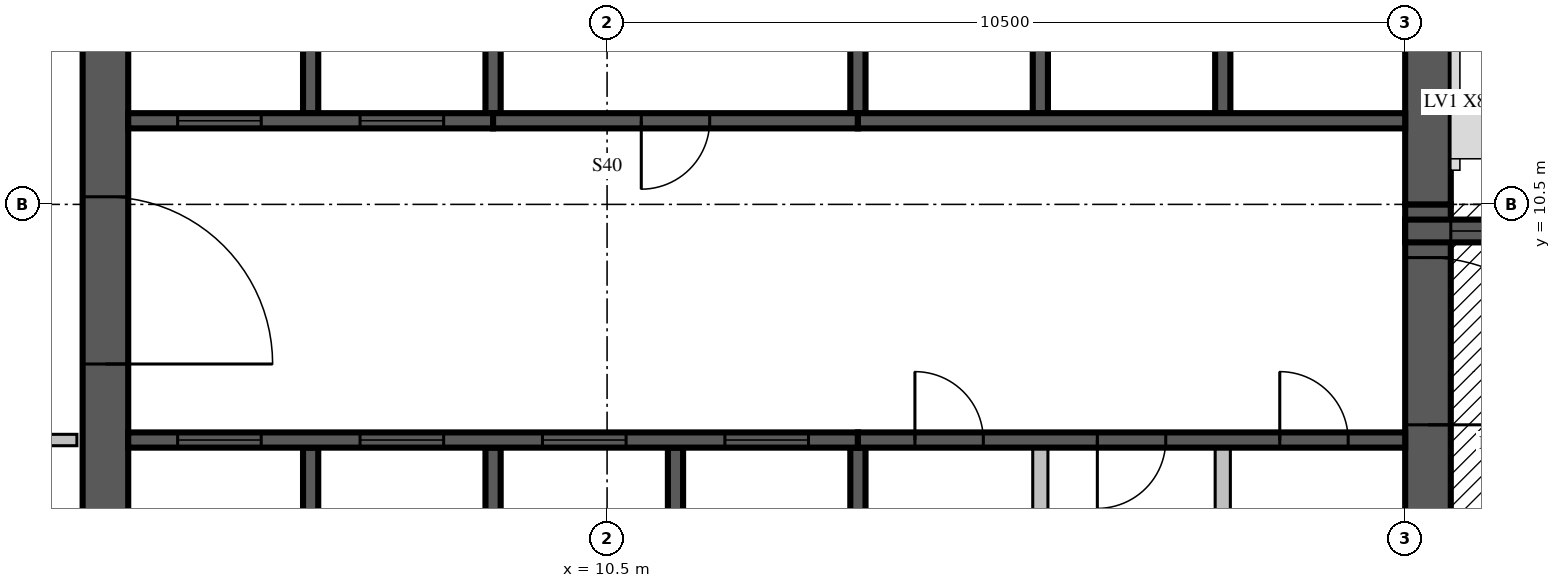
"""IFC4 building model, lengths in metres.
Left out: names, types, materials, properties, quantities, classifications, styles, units other than length and angle.
Written with IfcOpenShell. Run it as: python <this file> out.ifc"""

import sys

from ifc_helpers import new_model, si_unit, direction, frame, frame_2d, origin, place, context, subcontext, project, spatial, rectangle, extrude, source, transform, mapped, element, fill, save


model = new_model("IFC4")
c1 = context("Model", 3, precision=1e-05, world=origin(), true_north=direction((0.0, 1.0)))
c2 = subcontext(c1, "Body", "Model", "MODEL_VIEW")
j1 = project(units=[si_unit("LENGTHUNIT", "METRE"), si_unit("PLANEANGLEUNIT", "RADIAN")], contexts=[c1])
p1 = place(None, origin())
s1 = spatial("IfcSite", under=j1, at=p1, CompositionType="ELEMENT")
p2 = place(p1, origin())
s2 = spatial("IfcBuilding", under=s1, at=p2, CompositionType="ELEMENT")
p3 = place(p2, frame((0.0, 0.0, 330.0)))
s3 = spatial("IfcBuildingStorey", under=s2, at=p3, CompositionType="ELEMENT", Elevation=330.0)
m1 = source(origin(), c2, "Body", "SweptSolid", [
    extrude(rectangle(XDim=17.4, YDim=0.6, at=frame_2d((8.7, 0.0))), origin(), (0.0, 0.0, 1.0), 3.5),
])
p4 = place(p3, frame((3.9, 4.2, 0.0), z_axis=(0.0, 0.0, 1.0), x_axis=(0.0, 1.0, 0.0)))
e1 = element("IfcWall", 1, at=p4, inside=s3, PredefinedType="SHEAR", context=c2, shape_type="MappedRepresentation", body=[
    mapped(m1, transform((0.0, 0.0, 0.0), scale=1.0)),
])
m2 = source(origin(), c2, "Body", "SweptSolid", [
    extrude(rectangle(XDim=2.2, YDim=2.1, at=frame_2d((1.1, 1.05))), frame((0.0, 0.31, 0.0), z_axis=(0.0, -1.0, 0.0), x_axis=(1.0, 0.0, 0.0)), (0.0, 0.0, 1.0), 0.62),
])
p5 = place(p4, frame((4.2, 0.0, 0.0)))
e2 = element("IfcOpeningElement", 2, at=p5, cuts=e1, PredefinedType="OPENING", context=c2, shape_type="MappedRepresentation", body=[
    mapped(m2, transform((0.0, 0.0, 0.0), scale=1.0)),
])
m3 = source(origin(), c2, "Body", "SweptSolid", [
    extrude(rectangle(XDim=6.3, YDim=0.6, at=frame_2d((3.15, 0.0))), origin(), (0.0, 0.0, 1.0), 3.5),
])
p6 = place(p3, frame((21.3, 4.2, 0.0), z_axis=(0.0, 0.0, 1.0), x_axis=(0.0, 1.0, 0.0)))
e3 = element("IfcWall", 3, at=p6, inside=s3, PredefinedType="SHEAR", context=c2, shape_type="MappedRepresentation", body=[
    mapped(m3, transform((0.0, 0.0, 0.0), scale=1.0)),
])
p7 = place(p6, frame((3.4, 0.0, 0.0)))
e4 = element("IfcOpeningElement", 4, at=p7, cuts=e3, PredefinedType="OPENING", context=c2, shape_type="MappedRepresentation", body=[
    mapped(m2, transform((0.0, 0.0, 0.0), scale=1.0)),
])
m4 = source(origin(), c2, "Body", "SweptSolid", [
    extrude(rectangle(XDim=10.5, YDim=0.6, at=frame_2d((5.25, 0.0))), origin(), (0.0, 0.0, 1.0), 3.5),
])
p8 = place(p3, frame((21.3, 10.5, 0.0), z_axis=(0.0, 0.0, 1.0), x_axis=(0.0, 1.0, 0.0)))
e5 = element("IfcWall", 5, at=p8, inside=s3, PredefinedType="SHEAR", context=c2, shape_type="MappedRepresentation", body=[
    mapped(m4, transform((0.0, 0.0, 0.0), scale=1.0)),
])
m5 = source(origin(), c2, "Body", "SweptSolid", [
    extrude(rectangle(XDim=1.2, YDim=2.4, at=frame_2d((0.6, 1.2))), frame((0.0, 0.31, 0.0), z_axis=(0.0, -1.0, 0.0), x_axis=(1.0, 0.0, 0.0)), (0.0, 0.0, 1.0), 0.62),
])
p9 = place(p8, frame((5.7, 0.0, 0.6)))
e6 = element("IfcOpeningElement", 6, at=p9, cuts=e5, PredefinedType="OPENING", context=c2, shape_type="MappedRepresentation", body=[
    mapped(m5, transform((0.0, 0.0, 0.0), scale=1.0)),
])
p10 = place(p3, frame((21.0, 10.15, 0.0), z_axis=(0.0, 0.0, 1.0), x_axis=(1.0, 0.0, 0.0)))
e7 = element("IfcWall", 7, at=p10, inside=s3, PredefinedType="SOLIDWALL", context=c2, shape_type="SweptSolid", body=[
    extrude(rectangle(XDim=4.8, YDim=0.3, at=frame_2d((2.4, 0.0))), origin(), (0.0, 0.0, 1.0), 3.1),
])
m6 = source(origin(), c2, "Body", "SweptSolid", [
    extrude(rectangle(XDim=3.6, YDim=2.0, at=frame_2d((1.8, 1.0))), frame((0.0, 0.16, 0.0), z_axis=(0.0, -1.0, 0.0), x_axis=(1.0, 0.0, 0.0)), (0.0, 0.0, 1.0), 0.32),
])
p11 = place(p10, frame((0.6, 0.0, 0.6)))
e8 = element("IfcOpeningElement", 8, at=p11, cuts=e7, PredefinedType="OPENING", context=c2, shape_type="MappedRepresentation", body=[
    mapped(m6, transform((0.0, 0.0, 0.0), scale=1.0)),
])
m7 = source(origin(), c2, "Body", "SweptSolid", [
    extrude(rectangle(XDim=3.1, YDim=0.2, at=frame_2d((1.55, 0.0))), origin(), (0.0, 0.0, 1.0), 3.5),
])
for number, where, z_axis, x_axis in (
    (9, (6.6, 4.2, 0.0), (0.0, 0.0, 1.0), (0.0, 1.0, 0.0)),
    (10, (9.0, 4.2, 0.0), (0.0, 0.0, 1.0), (0.0, 1.0, 0.0)),
    (11, (11.4, 4.2, 0.0), (0.0, 0.0, 1.0), (0.0, 1.0, 0.0)),
):
    element("IfcWall", number, at=place(p3, frame(where, z_axis=z_axis, x_axis=x_axis)), inside=s3, PredefinedType="SOLIDWALL", context=c2, shape_type="MappedRepresentation", body=[
        mapped(m7, transform((0.0, 0.0, 0.0), scale=1.0)),
    ])
m8 = source(origin(), c2, "Body", "SweptSolid", [
    extrude(rectangle(XDim=3.1, YDim=0.2, at=frame_2d((1.55, 0.0))), origin(), (0.0, 0.0, 1.0), 3.1),
])
p12 = place(p3, frame((13.8, 4.2, 0.0), z_axis=(0.0, 0.0, 1.0), x_axis=(0.0, 1.0, 0.0)))
e12 = element("IfcWall", 12, at=p12, inside=s3, PredefinedType="SOLIDWALL", context=c2, shape_type="MappedRepresentation", body=[
    mapped(m8, transform((0.0, 0.0, 0.0), scale=1.0)),
])
m9 = source(origin(), c2, "Body", "SweptSolid", [
    extrude(rectangle(XDim=3.1, YDim=0.2, at=frame_2d((1.55, 0.0))), origin(), (0.0, 0.0, 1.0), 3.1),
])
for number, where, z_axis, x_axis in (
    (13, (16.2, 4.2, 0.0), (0.0, 0.0, 1.0), (0.0, 1.0, 0.0)),
    (14, (18.6, 4.2, 0.0), (0.0, 0.0, 1.0), (0.0, 1.0, 0.0)),
):
    element("IfcWall", number, at=place(p3, frame(where, z_axis=z_axis, x_axis=x_axis)), inside=s3, PredefinedType="PARTITIONING", context=c2, shape_type="MappedRepresentation", body=[
        mapped(m9, transform((0.0, 0.0, 0.0), scale=1.0)),
    ])
m10 = source(origin(), c2, "Body", "SweptSolid", [
    extrude(rectangle(XDim=3.0, YDim=0.2, at=frame_2d((1.5, 0.0))), origin(), (0.0, 0.0, 1.0), 3.5),
])
p13 = place(p3, frame((6.6, 11.7, 0.0), z_axis=(0.0, 0.0, 1.0), x_axis=(0.0, 1.0, 0.0)))
e15 = element("IfcWall", 15, at=p13, inside=s3, PredefinedType="SOLIDWALL", context=c2, shape_type="MappedRepresentation", body=[
    mapped(m10, transform((0.0, 0.0, 0.0), scale=1.0)),
])
m11 = source(origin(), c2, "Body", "SweptSolid", [
    extrude(rectangle(XDim=3.0, YDim=0.2, at=frame_2d((1.5, 0.0))), origin(), (0.0, 0.0, 1.0), 3.1),
])
for number, where, z_axis, x_axis in (
    (16, (9.0, 11.7, 0.0), (0.0, 0.0, 1.0), (0.0, 1.0, 0.0)),
    (17, (13.8, 11.7, 0.0), (0.0, 0.0, 1.0), (0.0, 1.0, 0.0)),
):
    element("IfcWall", number, at=place(p3, frame(where, z_axis=z_axis, x_axis=x_axis)), inside=s3, PredefinedType="SOLIDWALL", context=c2, shape_type="MappedRepresentation", body=[
        mapped(m11, transform((0.0, 0.0, 0.0), scale=1.0)),
    ])
for number, where, z_axis, x_axis in (
    (18, (16.2, 11.7, 0.0), (0.0, 0.0, 1.0), (0.0, 1.0, 0.0)),
    (19, (18.6, 11.7, 0.0), (0.0, 0.0, 1.0), (0.0, 1.0, 0.0)),
):
    element("IfcWall", number, at=place(p3, frame(where, z_axis=z_axis, x_axis=x_axis)), inside=s3, PredefinedType="SOLIDWALL", context=c2, shape_type="MappedRepresentation", body=[
        mapped(m10, transform((0.0, 0.0, 0.0), scale=1.0)),
    ])
m12 = source(origin(), c2, "Body", "SweptSolid", [
    extrude(rectangle(XDim=9.6, YDim=0.2, at=frame_2d((4.8, 0.0))), origin(), (0.0, 0.0, 1.0), 3.5),
])
p14 = place(p3, frame((4.2, 7.4, 0.0), z_axis=(0.0, 0.0, 1.0), x_axis=(1.0, 0.0, 0.0)))
e20 = element("IfcWall", 20, at=p14, inside=s3, PredefinedType="SOLIDWALL", context=c2, shape_type="MappedRepresentation", body=[
    mapped(m12, transform((0.0, 0.0, 0.0), scale=1.0)),
])
m13 = source(origin(), c2, "Body", "SweptSolid", [
    extrude(rectangle(XDim=1.1, YDim=2.1, at=frame_2d((0.55, 1.05))), frame((0.0, 0.11, 0.0), z_axis=(0.0, -1.0, 0.0), x_axis=(1.0, 0.0, 0.0)), (0.0, 0.0, 1.0), 0.22),
])
p15 = place(p14, frame((0.65, 0.0, 0.0)))
e21 = element("IfcOpeningElement", 21, at=p15, cuts=e20, PredefinedType="OPENING", context=c2, shape_type="MappedRepresentation", body=[
    mapped(m13, transform((0.0, 0.0, 0.0), scale=1.0)),
])
p16 = place(p14, frame((3.05, 0.0, 0.0)))
e22 = element("IfcOpeningElement", 22, at=p16, cuts=e20, PredefinedType="OPENING", context=c2, shape_type="MappedRepresentation", body=[
    mapped(m13, transform((0.0, 0.0, 0.0), scale=1.0)),
])
p17 = place(p14, frame((5.45, 0.0, 0.0)))
e23 = element("IfcOpeningElement", 23, at=p17, cuts=e20, PredefinedType="OPENING", context=c2, shape_type="MappedRepresentation", body=[
    mapped(m13, transform((0.0, 0.0, 0.0), scale=1.0)),
])
p18 = place(p14, frame((7.85, 0.0, 0.0)))
e24 = element("IfcOpeningElement", 24, at=p18, cuts=e20, PredefinedType="OPENING", context=c2, shape_type="MappedRepresentation", body=[
    mapped(m13, transform((0.0, 0.0, 0.0), scale=1.0)),
])
m14 = source(origin(), c2, "Body", "SweptSolid", [
    extrude(rectangle(XDim=7.2, YDim=0.2, at=frame_2d((3.6, 0.0))), origin(), (0.0, 0.0, 1.0), 3.1),
])
p19 = place(p3, frame((13.8, 7.4, 0.0), z_axis=(0.0, 0.0, 1.0), x_axis=(1.0, 0.0, 0.0)))
e25 = element("IfcWall", 25, at=p19, inside=s3, PredefinedType="SOLIDWALL", context=c2, shape_type="MappedRepresentation", body=[
    mapped(m14, transform((0.0, 0.0, 0.0), scale=1.0)),
])
m15 = source(origin(), c2, "Body", "SweptSolid", [
    extrude(rectangle(XDim=0.9, YDim=2.1, at=frame_2d((0.45, 1.05))), frame((0.0, 0.11, 0.0), z_axis=(0.0, -1.0, 0.0), x_axis=(1.0, 0.0, 0.0)), (0.0, 0.0, 1.0), 0.22),
])
p20 = place(p19, frame((0.75, 0.0, 0.0)))
e26 = element("IfcOpeningElement", 26, at=p20, cuts=e25, PredefinedType="OPENING", context=c2, shape_type="MappedRepresentation", body=[
    mapped(m15, transform((0.0, 0.0, 0.0), scale=1.0)),
])
p21 = place(p19, frame((3.15, 0.0, 0.0)))
e27 = element("IfcOpeningElement", 27, at=p21, cuts=e25, PredefinedType="OPENING", context=c2, shape_type="MappedRepresentation", body=[
    mapped(m15, transform((0.0, 0.0, 0.0), scale=1.0)),
])
p22 = place(p19, frame((5.55, 0.0, 0.0)))
e28 = element("IfcOpeningElement", 28, at=p22, cuts=e25, PredefinedType="OPENING", context=c2, shape_type="MappedRepresentation", body=[
    mapped(m15, transform((0.0, 0.0, 0.0), scale=1.0)),
])
m16 = source(origin(), c2, "Body", "SweptSolid", [
    extrude(rectangle(XDim=4.8, YDim=0.2, at=frame_2d((2.4, 0.0))), origin(), (0.0, 0.0, 1.0), 3.5),
])
p23 = place(p3, frame((4.2, 11.6, 0.0), z_axis=(0.0, 0.0, 1.0), x_axis=(1.0, 0.0, 0.0)))
e29 = element("IfcWall", 29, at=p23, inside=s3, PredefinedType="SOLIDWALL", context=c2, shape_type="MappedRepresentation", body=[
    mapped(m16, transform((0.0, 0.0, 0.0), scale=1.0)),
])
p24 = place(p23, frame((0.65, 0.0, 0.0)))
e30 = element("IfcOpeningElement", 30, at=p24, cuts=e29, PredefinedType="OPENING", context=c2, shape_type="MappedRepresentation", body=[
    mapped(m13, transform((0.0, 0.0, 0.0), scale=1.0)),
])
p25 = place(p23, frame((3.05, 0.0, 0.0)))
e31 = element("IfcOpeningElement", 31, at=p25, cuts=e29, PredefinedType="OPENING", context=c2, shape_type="MappedRepresentation", body=[
    mapped(m13, transform((0.0, 0.0, 0.0), scale=1.0)),
])
m17 = source(origin(), c2, "Body", "SweptSolid", [
    extrude(rectangle(XDim=4.8, YDim=0.2, at=frame_2d((2.4, 0.0))), origin(), (0.0, 0.0, 1.0), 3.1),
])
p26 = place(p3, frame((9.0, 11.6, 0.0), z_axis=(0.0, 0.0, 1.0), x_axis=(1.0, 0.0, 0.0)))
e32 = element("IfcWall", 32, at=p26, inside=s3, PredefinedType="SOLIDWALL", context=c2, shape_type="MappedRepresentation", body=[
    mapped(m17, transform((0.0, 0.0, 0.0), scale=1.0)),
])
p27 = place(p26, frame((1.95, 0.0, 0.0)))
e33 = element("IfcOpeningElement", 33, at=p27, cuts=e32, PredefinedType="OPENING", context=c2, shape_type="MappedRepresentation", body=[
    mapped(m15, transform((0.0, 0.0, 0.0), scale=1.0)),
])
m18 = source(origin(), c2, "Body", "SweptSolid", [
    extrude(rectangle(XDim=7.2, YDim=0.2, at=frame_2d((3.6, 0.0))), origin(), (0.0, 0.0, 1.0), 3.5),
])
p28 = place(p3, frame((13.8, 11.6, 0.0), z_axis=(0.0, 0.0, 1.0), x_axis=(1.0, 0.0, 0.0)))
e34 = element("IfcWall", 34, at=p28, inside=s3, PredefinedType="SOLIDWALL", context=c2, shape_type="MappedRepresentation", body=[
    mapped(m18, transform((0.0, 0.0, 0.0), scale=1.0)),
])
m19 = source(origin(), c2, "Body", "SweptSolid", [
    extrude(rectangle(XDim=3.225, YDim=0.15, at=frame_2d((1.613, 0.0))), origin(), (0.0, 0.0, 1.0), 3.1),
])
p29 = place(p3, frame((0.3, 7.4, 0.0), z_axis=(0.0, 0.0, 1.0), x_axis=(1.0, 0.0, 0.0)))
e35 = element("IfcWall", 35, at=p29, inside=s3, PredefinedType="PARTITIONING", context=c2, shape_type="MappedRepresentation", body=[
    mapped(m19, transform((0.0, 0.0, 0.0), scale=1.0)),
])
m20 = source(origin(), c2, "Body", "SweptSolid", [
    extrude(rectangle(XDim=0.9, YDim=2.1, at=frame_2d((0.45, 1.05))), frame((0.0, 0.085, 0.0), z_axis=(0.0, -1.0, 0.0), x_axis=(1.0, 0.0, 0.0)), (0.0, 0.0, 1.0), 0.17),
])
p30 = place(p29, frame((1.2, 0.0, 0.0)))
e36 = element("IfcOpeningElement", 36, at=p30, cuts=e35, PredefinedType="OPENING", context=c2, shape_type="MappedRepresentation", body=[
    mapped(m20, transform((0.0, 0.0, 0.0), scale=1.0)),
])
m21 = source(origin(), c2, "Body", "SweptSolid", [
    extrude(rectangle(XDim=3.6, YDim=2.0, at=frame_2d((1.8, 1.0))), frame((0.0, 0.03, 0.0), z_axis=(0.0, -1.0, 0.0), x_axis=(1.0, 0.0, 0.0)), (0.0, 0.0, 1.0), 0.06),
])
p31 = place(p11, origin())
e37 = element("IfcWindow", 37, at=p31, inside=s3, PartitioningType="SINGLE_PANEL", PredefinedType="WINDOW", context=c2, shape_type="MappedRepresentation", body=[
    mapped(m21, transform((0.0, 0.0, 0.0), scale=1.0)),
])
fill(e8, e37)
m22 = source(origin(), c2, "Body", "SweptSolid", [
    extrude(rectangle(XDim=1.1, YDim=2.1, at=frame_2d((0.55, 1.05))), frame((0.0, 0.025, 0.0), z_axis=(0.0, -1.0, 0.0), x_axis=(1.0, 0.0, 0.0)), (0.0, 0.0, 1.0), 0.05),
])
p32 = place(p15, origin())
e38 = element("IfcDoor", 38, at=p32, inside=s3, OperationType="SLIDING_TO_LEFT", PredefinedType="DOOR", context=c2, shape_type="MappedRepresentation", body=[
    mapped(m22, transform((0.0, 0.0, 0.0), scale=1.0)),
])
fill(e21, e38)
p33 = place(p16, origin())
e39 = element("IfcDoor", 39, at=p33, inside=s3, OperationType="SLIDING_TO_LEFT", PredefinedType="DOOR", context=c2, shape_type="MappedRepresentation", body=[
    mapped(m22, transform((0.0, 0.0, 0.0), scale=1.0)),
])
fill(e22, e39)
p34 = place(p17, origin())
e40 = element("IfcDoor", 40, at=p34, inside=s3, OperationType="SLIDING_TO_LEFT", PredefinedType="DOOR", context=c2, shape_type="MappedRepresentation", body=[
    mapped(m22, transform((0.0, 0.0, 0.0), scale=1.0)),
])
fill(e23, e40)
p35 = place(p18, origin())
e41 = element("IfcDoor", 41, at=p35, inside=s3, OperationType="SLIDING_TO_LEFT", PredefinedType="DOOR", context=c2, shape_type="MappedRepresentation", body=[
    mapped(m22, transform((0.0, 0.0, 0.0), scale=1.0)),
])
fill(e24, e41)
m23 = source(origin(), c2, "Body", "SweptSolid", [
    extrude(rectangle(XDim=0.9, YDim=2.1, at=frame_2d((0.45, 1.05))), frame((0.0, 0.025, 0.0), z_axis=(0.0, -1.0, 0.0), x_axis=(1.0, 0.0, 0.0)), (0.0, 0.0, 1.0), 0.05),
])
p36 = place(p20, origin())
e42 = element("IfcDoor", 42, at=p36, inside=s3, OperationType="SINGLE_SWING_LEFT", PredefinedType="DOOR", context=c2, shape_type="MappedRepresentation", body=[
    mapped(m23, transform((0.0, 0.0, 0.0), scale=1.0)),
])
fill(e26, e42)
p37 = place(p21, origin())
e43 = element("IfcDoor", 43, at=p37, inside=s3, OperationType="SINGLE_SWING_RIGHT", PredefinedType="DOOR", context=c2, shape_type="MappedRepresentation", body=[
    mapped(m23, transform((0.0, 0.0, 0.0), scale=1.0)),
])
fill(e27, e43)
p38 = place(p22, origin())
e44 = element("IfcDoor", 44, at=p38, inside=s3, OperationType="SINGLE_SWING_LEFT", PredefinedType="DOOR", context=c2, shape_type="MappedRepresentation", body=[
    mapped(m23, transform((0.0, 0.0, 0.0), scale=1.0)),
])
fill(e28, e44)
p39 = place(p24, origin())
e45 = element("IfcDoor", 45, at=p39, inside=s3, OperationType="SLIDING_TO_LEFT", PredefinedType="DOOR", context=c2, shape_type="MappedRepresentation", body=[
    mapped(m22, transform((0.0, 0.0, 0.0), scale=1.0)),
])
fill(e30, e45)
p40 = place(p25, origin())
e46 = element("IfcDoor", 46, at=p40, inside=s3, OperationType="SLIDING_TO_LEFT", PredefinedType="DOOR", context=c2, shape_type="MappedRepresentation", body=[
    mapped(m22, transform((0.0, 0.0, 0.0), scale=1.0)),
])
fill(e31, e46)
p41 = place(p27, origin())
e47 = element("IfcDoor", 47, at=p41, inside=s3, OperationType="SINGLE_SWING_RIGHT", PredefinedType="DOOR", context=c2, shape_type="MappedRepresentation", body=[
    mapped(m23, transform((0.0, 0.0, 0.0), scale=1.0)),
])
fill(e33, e47)
m24 = source(origin(), c2, "Body", "SweptSolid", [
    extrude(rectangle(XDim=2.2, YDim=2.1, at=frame_2d((1.1, 1.05))), frame((0.0, 0.025, 0.0), z_axis=(0.0, -1.0, 0.0), x_axis=(1.0, 0.0, 0.0)), (0.0, 0.0, 1.0), 0.05),
])
p42 = place(p7, origin())
e48 = element("IfcDoor", 48, at=p42, inside=s3, OperationType="DOUBLE_DOOR_SINGLE_SWING", PredefinedType="DOOR", context=c2, shape_type="MappedRepresentation", body=[
    mapped(m24, transform((0.0, 0.0, 0.0), scale=1.0)),
])
fill(e4, e48)
p43 = place(p5, origin())
e49 = element("IfcDoor", 49, at=p43, inside=s3, OperationType="DOUBLE_DOOR_SINGLE_SWING", PredefinedType="DOOR", context=c2, shape_type="MappedRepresentation", body=[
    mapped(m24, transform((0.0, 0.0, 0.0), scale=1.0)),
])
fill(e2, e49)
save(model, sys.argv[1])
